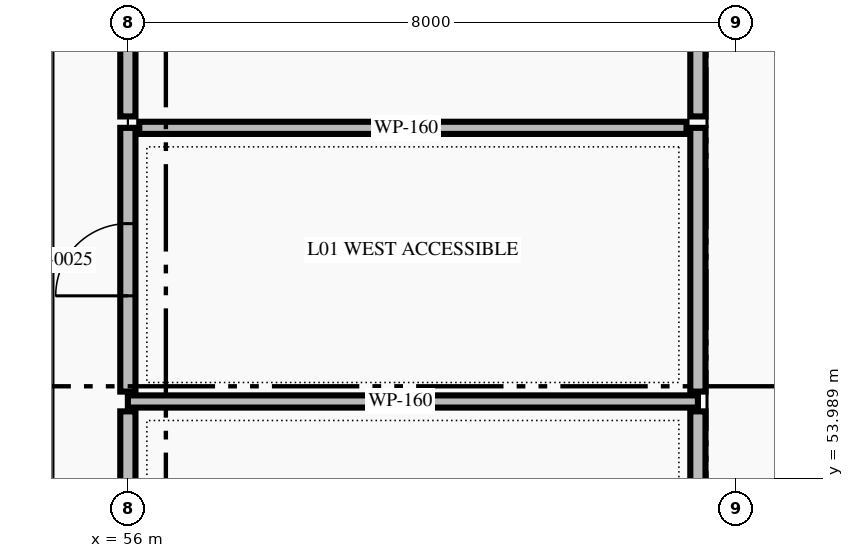
"""IFC4 building model, lengths in metres.
Left out: names, types, materials, properties, quantities, classifications, styles, units other than length and angle.
Written with IfcOpenShell. Run it as: python <this file> out.ifc"""

import sys

from ifc_helpers import new_model, si_unit, direction, frame, frame_2d, origin, place, context, subcontext, project, spatial, rectangle, extrude, element, fill, save


model = new_model("IFC4")
c1 = context("Model", 3, precision=1e-05, world=origin(), true_north=direction((0.0, 1.0)))
c2 = subcontext(c1, "Body", "Model", "MODEL_VIEW")
j1 = project(units=[si_unit("LENGTHUNIT", "METRE"), si_unit("PLANEANGLEUNIT", "RADIAN")], contexts=[c1])
p1 = place(None, origin())
s1 = spatial("IfcSite", under=j1, at=p1, CompositionType="ELEMENT")
p2 = place(p1, origin())
s2 = spatial("IfcBuilding", under=s1, at=p2, CompositionType="ELEMENT")
p3 = place(p2, origin())
s3 = spatial("IfcBuildingStorey", under=s2, at=p3, CompositionType="ELEMENT", Elevation=0.0)
p4 = place(p3, frame((56.0, 55.0, 0.0), z_axis=(0.0, 0.0, 1.0), x_axis=(1.0, 0.0, 0.0)))
e1 = element("IfcWall", 1, at=p4, inside=s3, PredefinedType="PARTITIONING", context=c2, shape_type="SweptSolid", body=[
    extrude(rectangle(XDim=7.5, YDim=0.16, at=frame_2d((3.75, 0.0))), origin(), (0.0, 0.0, 1.0), 5.16),
])
p5 = place(p3, frame((56.0, 53.635, 0.0), z_axis=(0.0, 0.0, 1.0), x_axis=(0.0, 1.0, 0.0)))
e2 = element("IfcWall", 2, at=p5, inside=s3, PredefinedType="STANDARD", context=c2, shape_type="SweptSolid", body=[
    extrude(rectangle(XDim=1.235, YDim=0.2, at=frame_2d((0.618, 0.0))), origin(), (0.0, 0.0, 1.0), 4.46),
])
p6 = place(p3, frame((63.5, 54.87, 0.0), z_axis=(0.0, 0.0, 1.0), x_axis=(0.0, -1.0, 0.0)))
e3 = element("IfcWall", 3, at=p6, inside=s3, PredefinedType="STANDARD", context=c2, shape_type="SweptSolid", body=[
    extrude(rectangle(XDim=3.37, YDim=0.2, at=frame_2d((1.685, 0.0))), origin(), (0.0, 0.0, 1.0), 5.16),
])
p7 = place(p3, frame((56.0, 55.13, 0.0), z_axis=(0.0, 0.0, 1.0), x_axis=(0.0, 1.0, 0.0)))
e4 = element("IfcWall", 4, at=p7, inside=s3, PredefinedType="STANDARD", context=c2, shape_type="SweptSolid", body=[
    extrude(rectangle(XDim=3.47, YDim=0.2, at=frame_2d((1.735, 0.0))), origin(), (0.0, 0.0, 1.0), 4.46),
])
p8 = place(p7, frame((1.26, 0.0, 0.0)))
e5 = element("IfcOpeningElement", 5, at=p8, cuts=e4, PredefinedType="OPENING", context=c2, shape_type="SweptSolid", body=[
    extrude(rectangle(XDim=0.95, YDim=2.15, at=frame_2d((0.475, 1.075))), frame((0.0, 0.11, 0.0), z_axis=(0.0, -1.0, 0.0), x_axis=(1.0, 0.0, 0.0)), (0.0, 0.0, 1.0), 0.22),
])
p9 = place(p3, frame((63.5, 58.6, 0.0), z_axis=(0.0, 0.0, 1.0), x_axis=(0.0, -1.0, 0.0)))
e6 = element("IfcWall", 6, at=p9, inside=s3, PredefinedType="STANDARD", context=c2, shape_type="SweptSolid", body=[
    extrude(rectangle(XDim=3.47, YDim=0.2, at=frame_2d((1.735, 0.0))), origin(), (0.0, 0.0, 1.0), 5.16),
])
p10 = place(p3, frame((56.15, 58.6, 0.0), z_axis=(0.0, 0.0, 1.0), x_axis=(1.0, 0.0, 0.0)))
e7 = element("IfcWall", 7, at=p10, inside=s3, PredefinedType="PARTITIONING", context=c2, shape_type="SweptSolid", body=[
    extrude(rectangle(XDim=7.2, YDim=0.16, at=frame_2d((3.6, 0.0))), origin(), (0.0, 0.0, 1.0), 5.16),
])
p11 = place(p3, frame((56.0, 60.365, 0.0), z_axis=(0.0, 0.0, 1.0), x_axis=(0.0, -1.0, 0.0)))
e8 = element("IfcWall", 8, at=p11, inside=s3, PredefinedType="STANDARD", context=c2, shape_type="SweptSolid", body=[
    extrude(rectangle(XDim=1.615, YDim=0.2, at=frame_2d((0.808, 0.0))), origin(), (0.0, 0.0, 1.0), 4.46),
])
p12 = place(p3, frame((63.5, 58.75, 0.0), z_axis=(0.0, 0.0, 1.0), x_axis=(0.0, 1.0, 0.0)))
e9 = element("IfcWall", 9, at=p12, inside=s3, PredefinedType="STANDARD", context=c2, shape_type="SweptSolid", body=[
    extrude(rectangle(XDim=9.65, YDim=0.2, at=frame_2d((4.825, 0.0))), origin(), (0.0, 0.0, 1.0), 5.16),
])
p13 = place(p12, frame((7.55, 0.0, 0.0)))
e10 = element("IfcOpeningElement", 10, at=p13, cuts=e9, PredefinedType="OPENING", context=c2, shape_type="SweptSolid", body=[
    extrude(rectangle(XDim=1.05, YDim=2.15, at=frame_2d((0.525, 1.075))), frame((0.0, 0.11, 0.0), z_axis=(0.0, -1.0, 0.0), x_axis=(1.0, 0.0, 0.0)), (0.0, 0.0, 1.0), 0.22),
])
p14 = place(p8, origin())
e11 = element("IfcDoor", 11, at=p14, inside=s3, OperationType="SINGLE_SWING_LEFT", PredefinedType="DOOR", context=c2, shape_type="SweptSolid", body=[
    extrude(rectangle(XDim=0.95, YDim=2.15, at=frame_2d((0.475, 1.075))), frame((0.0, 0.025, 0.0), z_axis=(0.0, -1.0, 0.0), x_axis=(1.0, 0.0, 0.0)), (0.0, 0.0, 1.0), 0.05),
])
fill(e5, e11)
save(model, sys.argv[1])
